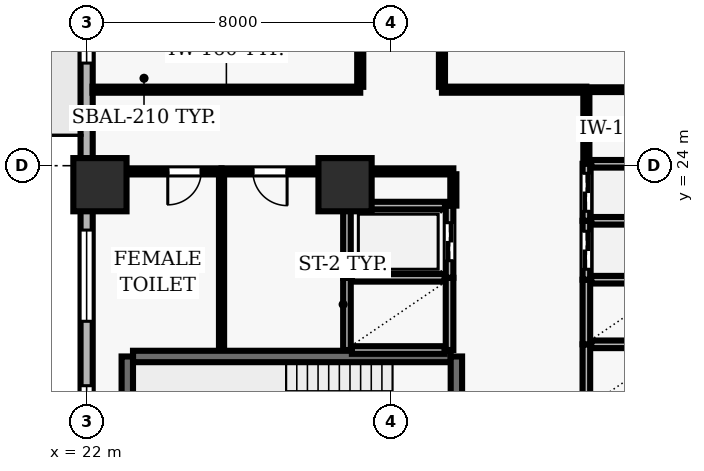
"""IFC4 building model, lengths in metres.
Left out: names, types, materials, properties, quantities, classifications, styles, units other than length and angle.
Written with IfcOpenShell. Run it as: python <this file> out.ifc"""

import sys

from ifc_helpers import new_model, si_unit, direction, frame, frame_2d, origin, origin_2d, place, context, subcontext, project, spatial, rectangle, extrude, element, fill, save


model = new_model("IFC4")
c1 = context("Model", 3, precision=1e-05, world=origin(), true_north=direction((0.0, 1.0)))
c2 = subcontext(c1, "Body", "Model", "MODEL_VIEW")
j1 = project(units=[si_unit("LENGTHUNIT", "METRE"), si_unit("PLANEANGLEUNIT", "RADIAN")], contexts=[c1])
p1 = place(None, origin())
s1 = spatial("IfcSite", under=j1, at=p1, CompositionType="ELEMENT")
p2 = place(p1, origin())
s2 = spatial("IfcBuilding", under=s1, at=p2, CompositionType="ELEMENT")
p3 = place(p2, frame((0.0, 0.0, 70.0)))
s3 = spatial("IfcBuildingStorey", under=s2, at=p3, CompositionType="ELEMENT", Elevation=70.0)
for number, where, z_axis, x_axis in (
    (1, (22.35, 23.5, 0.0), (0.0, 0.0, 1.0), (1.0, 0.0, 0.0)),
    (2, (28.8, 23.5, 0.0), (0.0, 0.0, 1.0), (1.0, 0.0, 0.0)),
):
    element("IfcColumn", number, at=place(p3, frame(where, z_axis=z_axis, x_axis=x_axis)), inside=s3, PredefinedType="COLUMN", context=c2, shape_type="SweptSolid", body=[
        extrude(rectangle(XDim=1.4, YDim=1.4, at=origin_2d()), origin(), (0.0, 0.0, 1.0), 3.9),
    ])
p4 = place(p3, frame((22.0, 51.5, 0.0), z_axis=(0.0, 0.0, 1.0), x_axis=(0.0, -1.0, 0.0)))
e3 = element("IfcWall", 3, at=p4, inside=s3, PredefinedType="SOLIDWALL", context=c2, shape_type="SweptSolid", body=[
    extrude(rectangle(XDim=49.0, YDim=0.32, at=frame_2d((24.5, 0.0))), origin(), (0.0, 0.0, 1.0), 3.69),
])
p5 = place(p4, frame((12.1, 0.0, 0.0)))
e4 = element("IfcOpeningElement", 4, at=p5, cuts=e3, PredefinedType="OPENING", context=c2, shape_type="SweptSolid", body=[
    extrude(rectangle(XDim=1.0, YDim=2.2, at=frame_2d((0.5, 1.1))), frame((0.0, 0.17, 0.0), z_axis=(0.0, -1.0, 0.0), x_axis=(1.0, 0.0, 0.0)), (0.0, 0.0, 1.0), 0.34),
])
p6 = place(p4, frame((1.522, 0.0, 0.9)))
e5 = element("IfcOpeningElement", 5, at=p6, cuts=e3, PredefinedType="OPENING", context=c2, shape_type="SweptSolid", body=[
    extrude(rectangle(XDim=2.4, YDim=1.6, at=frame_2d((1.2, 0.8))), frame((0.0, 0.17, 0.0), z_axis=(0.0, -1.0, 0.0), x_axis=(1.0, 0.0, 0.0)), (0.0, 0.0, 1.0), 0.34),
])
p7 = place(p4, frame((6.967, 0.0, 0.9)))
e6 = element("IfcOpeningElement", 6, at=p7, cuts=e3, PredefinedType="OPENING", context=c2, shape_type="SweptSolid", body=[
    extrude(rectangle(XDim=2.4, YDim=1.6, at=frame_2d((1.2, 0.8))), frame((0.0, 0.17, 0.0), z_axis=(0.0, -1.0, 0.0), x_axis=(1.0, 0.0, 0.0)), (0.0, 0.0, 1.0), 0.34),
])
p8 = place(p4, frame((17.856, 0.0, 0.9)))
e7 = element("IfcOpeningElement", 7, at=p8, cuts=e3, PredefinedType="OPENING", context=c2, shape_type="SweptSolid", body=[
    extrude(rectangle(XDim=2.4, YDim=1.6, at=frame_2d((1.2, 0.8))), frame((0.0, 0.17, 0.0), z_axis=(0.0, -1.0, 0.0), x_axis=(1.0, 0.0, 0.0)), (0.0, 0.0, 1.0), 0.34),
])
p9 = place(p4, frame((22.4, 0.0, 0.9)))
e8 = element("IfcOpeningElement", 8, at=p9, cuts=e3, PredefinedType="OPENING", context=c2, shape_type="SweptSolid", body=[
    extrude(rectangle(XDim=2.4, YDim=1.6, at=frame_2d((1.2, 0.8))), frame((0.0, 0.17, 0.0), z_axis=(0.0, -1.0, 0.0), x_axis=(1.0, 0.0, 0.0)), (0.0, 0.0, 1.0), 0.34),
])
p10 = place(p4, frame((29.194, 0.0, 0.9)))
e9 = element("IfcOpeningElement", 9, at=p10, cuts=e3, PredefinedType="OPENING", context=c2, shape_type="SweptSolid", body=[
    extrude(rectangle(XDim=2.4, YDim=1.6, at=frame_2d((1.2, 0.8))), frame((0.0, 0.17, 0.0), z_axis=(0.0, -1.0, 0.0), x_axis=(1.0, 0.0, 0.0)), (0.0, 0.0, 1.0), 0.34),
])
p11 = place(p4, frame((33.289, 0.0, 0.9)))
e10 = element("IfcOpeningElement", 10, at=p11, cuts=e3, PredefinedType="OPENING", context=c2, shape_type="SweptSolid", body=[
    extrude(rectangle(XDim=2.4, YDim=1.6, at=frame_2d((1.2, 0.8))), frame((0.0, 0.17, 0.0), z_axis=(0.0, -1.0, 0.0), x_axis=(1.0, 0.0, 0.0)), (0.0, 0.0, 1.0), 0.34),
])
p12 = place(p4, frame((39.633, 0.0, 0.9)))
e11 = element("IfcOpeningElement", 11, at=p12, cuts=e3, PredefinedType="OPENING", context=c2, shape_type="SweptSolid", body=[
    extrude(rectangle(XDim=2.4, YDim=1.6, at=frame_2d((1.2, 0.8))), frame((0.0, 0.17, 0.0), z_axis=(0.0, -1.0, 0.0), x_axis=(1.0, 0.0, 0.0)), (0.0, 0.0, 1.0), 0.34),
])
p13 = place(p3, frame((31.58, 18.98, 0.0), z_axis=(0.0, 0.0, 1.0), x_axis=(-1.0, 0.0, 0.0)))
e12 = element("IfcWall", 12, at=p13, inside=s3, PredefinedType="SHEAR", context=c2, shape_type="SweptSolid", body=[
    extrude(rectangle(XDim=8.36, YDim=0.3, at=frame_2d((4.18, 0.0))), origin(), (0.0, 0.0, 1.0), 3.69),
])
p14 = place(p3, frame((23.07, 18.98, 0.0), z_axis=(0.0, 0.0, 1.0), x_axis=(0.0, -1.0, 0.0)))
e13 = element("IfcWall", 13, at=p14, inside=s3, PredefinedType="SHEAR", context=c2, shape_type="SweptSolid", body=[
    extrude(rectangle(XDim=3.51, YDim=0.3, at=frame_2d((1.755, 0.0))), origin(), (0.0, 0.0, 1.0), 3.69),
])
p15 = place(p3, frame((31.73, 15.47, 0.0), z_axis=(0.0, 0.0, 1.0), x_axis=(0.0, 1.0, 0.0)))
e14 = element("IfcWall", 14, at=p15, inside=s3, PredefinedType="SHEAR", context=c2, shape_type="SweptSolid", body=[
    extrude(rectangle(XDim=3.51, YDim=0.3, at=frame_2d((1.755, 0.0))), origin(), (0.0, 0.0, 1.0), 3.69),
])
p16 = place(p15, frame((1.18, 0.0, 0.0)))
e15 = element("IfcOpeningElement", 15, at=p16, cuts=e14, PredefinedType="OPENING", context=c2, shape_type="SweptSolid", body=[
    extrude(rectangle(XDim=1.15, YDim=2.15, at=frame_2d((0.575, 1.075))), frame((0.0, 0.16, 0.0), z_axis=(0.0, -1.0, 0.0), x_axis=(1.0, 0.0, 0.0)), (0.0, 0.0, 1.0), 0.32),
])
p17 = place(p3, frame((35.15, 19.3, 0.0), z_axis=(0.0, 0.0, 1.0), x_axis=(0.0, -1.0, 0.0)))
e16 = element("IfcWall", 16, at=p17, inside=s3, PredefinedType="SOLIDWALL", context=c2, shape_type="SweptSolid", body=[
    extrude(rectangle(XDim=1.7, YDim=0.2, at=frame_2d((0.85, 0.0))), origin(), (0.0, 0.0, 1.0), 3.69),
])
p18 = place(p3, frame((37.42, 19.3, 0.0), z_axis=(0.0, 0.0, 1.0), x_axis=(-1.0, 0.0, 0.0)))
e17 = element("IfcWall", 17, at=p18, inside=s3, PredefinedType="SOLIDWALL", context=c2, shape_type="SweptSolid", body=[
    extrude(rectangle(XDim=2.14, YDim=0.2, at=frame_2d((1.07, 0.0))), origin(), (0.0, 0.0, 1.0), 3.69),
])
p19 = place(p3, frame((35.15, 21.0, 0.0), z_axis=(0.0, 0.0, 1.0), x_axis=(0.0, -1.0, 0.0)))
e18 = element("IfcWall", 18, at=p19, inside=s3, PredefinedType="SOLIDWALL", context=c2, shape_type="SweptSolid", body=[
    extrude(rectangle(XDim=1.7, YDim=0.2, at=frame_2d((0.85, 0.0))), origin(), (0.0, 0.0, 1.0), 3.69),
])
p20 = place(p3, frame((37.42, 21.0, 0.0), z_axis=(0.0, 0.0, 1.0), x_axis=(-1.0, 0.0, 0.0)))
e19 = element("IfcWall", 19, at=p20, inside=s3, PredefinedType="SOLIDWALL", context=c2, shape_type="SweptSolid", body=[
    extrude(rectangle(XDim=2.14, YDim=0.2, at=frame_2d((1.07, 0.0))), origin(), (0.0, 0.0, 1.0), 3.69),
])
for number, where, z_axis, x_axis in (
    (20, (28.85, 21.05, 0.0), (0.0, 0.0, 1.0), (0.0, -1.0, 0.0)),
    (21, (31.55, 19.15, 0.0), (0.0, 0.0, 1.0), (0.0, 1.0, 0.0)),
):
    element("IfcWall", number, at=place(p3, frame(where, z_axis=z_axis, x_axis=x_axis)), inside=s3, PredefinedType="SOLIDWALL", context=c2, shape_type="SweptSolid", body=[
        extrude(rectangle(XDim=1.9, YDim=0.2, at=frame_2d((0.95, 0.0))), origin(), (0.0, 0.0, 1.0), 3.69),
    ])
for number, where, z_axis, x_axis in (
    (22, (28.98, 19.15, 0.0), (0.0, 0.0, 1.0), (1.0, 0.0, 0.0)),
    (23, (31.42, 21.05, 0.0), (0.0, 0.0, 1.0), (-1.0, 0.0, 0.0)),
):
    element("IfcWall", number, at=place(p3, frame(where, z_axis=z_axis, x_axis=x_axis)), inside=s3, PredefinedType="SOLIDWALL", context=c2, shape_type="SweptSolid", body=[
        extrude(rectangle(XDim=2.44, YDim=0.2, at=frame_2d((1.22, 0.0))), origin(), (0.0, 0.0, 1.0), 3.69),
    ])
p21 = place(p3, frame((35.15, 22.55, 0.0), z_axis=(0.0, 0.0, 1.0), x_axis=(0.0, -1.0, 0.0)))
e24 = element("IfcWall", 24, at=p21, inside=s3, PredefinedType="SOLIDWALL", context=c2, shape_type="SweptSolid", body=[
    extrude(rectangle(XDim=1.55, YDim=0.2, at=frame_2d((0.775, 0.0))), origin(), (0.0, 0.0, 1.0), 3.69),
])
p22 = place(p21, frame((0.275, 0.0, 0.0)))
e25 = element("IfcOpeningElement", 25, at=p22, cuts=e24, PredefinedType="OPENING", context=c2, shape_type="SweptSolid", body=[
    extrude(rectangle(XDim=1.0, YDim=2.1, at=frame_2d((0.5, 1.05))), frame((0.0, 0.11, 0.0), z_axis=(0.0, -1.0, 0.0), x_axis=(1.0, 0.0, 0.0)), (0.0, 0.0, 1.0), 0.22),
])
p23 = place(p3, frame((37.42, 22.55, 0.0), z_axis=(0.0, 0.0, 1.0), x_axis=(-1.0, 0.0, 0.0)))
e26 = element("IfcWall", 26, at=p23, inside=s3, PredefinedType="SOLIDWALL", context=c2, shape_type="SweptSolid", body=[
    extrude(rectangle(XDim=2.14, YDim=0.2, at=frame_2d((1.07, 0.0))), origin(), (0.0, 0.0, 1.0), 3.69),
])
p24 = place(p3, frame((35.15, 24.05, 0.0), z_axis=(0.0, 0.0, 1.0), x_axis=(0.0, -1.0, 0.0)))
e27 = element("IfcWall", 27, at=p24, inside=s3, PredefinedType="SOLIDWALL", context=c2, shape_type="SweptSolid", body=[
    extrude(rectangle(XDim=1.5, YDim=0.2, at=frame_2d((0.75, 0.0))), origin(), (0.0, 0.0, 1.0), 3.69),
])
p25 = place(p24, frame((0.25, 0.0, 0.0)))
e28 = element("IfcOpeningElement", 28, at=p25, cuts=e27, PredefinedType="OPENING", context=c2, shape_type="SweptSolid", body=[
    extrude(rectangle(XDim=1.0, YDim=2.1, at=frame_2d((0.5, 1.05))), frame((0.0, 0.11, 0.0), z_axis=(0.0, -1.0, 0.0), x_axis=(1.0, 0.0, 0.0)), (0.0, 0.0, 1.0), 0.22),
])
p26 = place(p3, frame((37.42, 24.05, 0.0), z_axis=(0.0, 0.0, 1.0), x_axis=(-1.0, 0.0, 0.0)))
e29 = element("IfcWall", 29, at=p26, inside=s3, PredefinedType="SOLIDWALL", context=c2, shape_type="SweptSolid", body=[
    extrude(rectangle(XDim=2.14, YDim=0.2, at=frame_2d((1.07, 0.0))), origin(), (0.0, 0.0, 1.0), 3.69),
])
p27 = place(p3, frame((28.85, 22.95, 0.0), z_axis=(0.0, 0.0, 1.0), x_axis=(0.0, -1.0, 0.0)))
e30 = element("IfcWall", 30, at=p27, inside=s3, PredefinedType="SOLIDWALL", context=c2, shape_type="SweptSolid", body=[
    extrude(rectangle(XDim=1.9, YDim=0.2, at=frame_2d((0.95, 0.0))), origin(), (0.0, 0.0, 1.0), 3.69),
])
p28 = place(p3, frame((31.55, 21.05, 0.0), z_axis=(0.0, 0.0, 1.0), x_axis=(0.0, 1.0, 0.0)))
e31 = element("IfcWall", 31, at=p28, inside=s3, PredefinedType="SOLIDWALL", context=c2, shape_type="SweptSolid", body=[
    extrude(rectangle(XDim=1.9, YDim=0.2, at=frame_2d((0.95, 0.0))), origin(), (0.0, 0.0, 1.0), 3.69),
])
p29 = place(p28, frame((0.45, 0.0, 0.0)))
e32 = element("IfcOpeningElement", 32, at=p29, cuts=e31, PredefinedType="OPENING", context=c2, shape_type="SweptSolid", body=[
    extrude(rectangle(XDim=1.0, YDim=2.1, at=frame_2d((0.5, 1.05))), frame((0.0, 0.11, 0.0), z_axis=(0.0, -1.0, 0.0), x_axis=(1.0, 0.0, 0.0)), (0.0, 0.0, 1.0), 0.22),
])
p30 = place(p3, frame((31.43, 22.95, 0.0), z_axis=(0.0, 0.0, 1.0), x_axis=(-1.0, 0.0, 0.0)))
e33 = element("IfcWall", 33, at=p30, inside=s3, PredefinedType="SOLIDWALL", context=c2, shape_type="SweptSolid", body=[
    extrude(rectangle(XDim=2.46, YDim=0.2, at=frame_2d((1.23, 0.0))), origin(), (0.0, 0.0, 1.0), 3.69),
])
p31 = place(p3, frame((25.55, 23.85, 0.0), z_axis=(0.0, 0.0, 1.0), x_axis=(-1.0, 0.0, 0.0)))
e34 = element("IfcWall", 34, at=p31, inside=s3, PredefinedType="PARTITIONING", context=c2, shape_type="SweptSolid", body=[
    extrude(rectangle(XDim=3.35, YDim=0.16, at=frame_2d((1.675, 0.0))), origin(), (0.0, 0.0, 1.0), 2.995),
])
p32 = place(p31, frame((0.535, 0.0, 0.0)))
e35 = element("IfcOpeningElement", 35, at=p32, cuts=e34, PredefinedType="OPENING", context=c2, shape_type="SweptSolid", body=[
    extrude(rectangle(XDim=0.88, YDim=2.1, at=frame_2d((0.44, 1.05))), frame((0.0, 0.09, 0.0), z_axis=(0.0, -1.0, 0.0), x_axis=(1.0, 0.0, 0.0)), (0.0, 0.0, 1.0), 0.18),
])
p33 = place(p3, frame((28.8, 23.85, 0.0), z_axis=(0.0, 0.0, 1.0), x_axis=(-1.0, 0.0, 0.0)))
e36 = element("IfcWall", 36, at=p33, inside=s3, PredefinedType="PARTITIONING", context=c2, shape_type="SweptSolid", body=[
    extrude(rectangle(XDim=3.25, YDim=0.16, at=frame_2d((1.625, 0.0))), origin(), (0.0, 0.0, 1.0), 2.995),
])
p34 = place(p33, frame((1.525, 0.0, 0.0)))
e37 = element("IfcOpeningElement", 37, at=p34, cuts=e36, PredefinedType="OPENING", context=c2, shape_type="SweptSolid", body=[
    extrude(rectangle(XDim=0.9, YDim=2.1, at=frame_2d((0.45, 1.05))), frame((0.0, 0.09, 0.0), z_axis=(0.0, -1.0, 0.0), x_axis=(1.0, 0.0, 0.0)), (0.0, 0.0, 1.0), 0.18),
])
p35 = place(p3, frame((28.8, 23.85, 0.0), z_axis=(0.0, 0.0, 1.0), x_axis=(1.0, 0.0, 0.0)))
e38 = element("IfcWall", 38, at=p35, inside=s3, PredefinedType="PARTITIONING", context=c2, shape_type="SweptSolid", body=[
    extrude(rectangle(XDim=2.85, YDim=0.16, at=frame_2d((1.425, 0.0))), origin(), (0.0, 0.0, 1.0), 3.69),
])
p36 = place(p3, frame((29.2, 26.0, 0.0), z_axis=(0.0, 0.0, 1.0), x_axis=(-1.0, 0.0, 0.0)))
e39 = element("IfcWall", 39, at=p36, inside=s3, PredefinedType="PARTITIONING", context=c2, shape_type="SweptSolid", body=[
    extrude(rectangle(XDim=7.045, YDim=0.16, at=frame_2d((3.522, 0.0))), origin(), (0.0, 0.0, 1.0), 3.69),
])
p37 = place(p3, frame((35.15, 26.0, 0.0), z_axis=(0.0, 0.0, 1.0), x_axis=(-1.0, 0.0, 0.0)))
e40 = element("IfcWall", 40, at=p37, inside=s3, PredefinedType="PARTITIONING", context=c2, shape_type="SweptSolid", body=[
    extrude(rectangle(XDim=3.8, YDim=0.16, at=frame_2d((1.9, 0.0))), origin(), (0.0, 0.0, 1.0), 3.69),
])
p38 = place(p3, frame((35.15, 26.0, 0.0), z_axis=(0.0, 0.0, 1.0), x_axis=(1.0, 0.0, 0.0)))
e41 = element("IfcWall", 41, at=p38, inside=s3, PredefinedType="PARTITIONING", context=c2, shape_type="SweptSolid", body=[
    extrude(rectangle(XDim=2.695, YDim=0.125, at=frame_2d((1.348, 0.0))), origin(), (0.0, 0.0, 1.0), 3.69),
])
p39 = place(p3, frame((25.55, 19.16, 0.0), z_axis=(0.0, 0.0, 1.0), x_axis=(0.0, 1.0, 0.0)))
e42 = element("IfcWall", 42, at=p39, inside=s3, PredefinedType="PARTITIONING", context=c2, shape_type="SweptSolid", body=[
    extrude(rectangle(XDim=4.615, YDim=0.135, at=frame_2d((2.308, 0.0))), origin(), (0.0, 0.0, 1.0), 3.69),
])
p40 = place(p3, frame((28.8, 22.95, 0.0), z_axis=(0.0, 0.0, 1.0), x_axis=(0.0, 1.0, 0.0)))
e43 = element("IfcWall", 43, at=p40, inside=s3, PredefinedType="PARTITIONING", context=c2, shape_type="SweptSolid", body=[
    extrude(rectangle(XDim=0.825, YDim=0.125, at=frame_2d((0.413, 0.0))), origin(), (0.0, 0.0, 1.0), 3.69),
])
p41 = place(p3, frame((29.2, 53.845, 0.0), z_axis=(0.0, 0.0, 1.0), x_axis=(0.0, -1.0, 0.0)))
e44 = element("IfcWall", 44, at=p41, inside=s3, PredefinedType="PARTITIONING", context=c2, shape_type="SweptSolid", body=[
    extrude(rectangle(XDim=27.77, YDim=0.16, at=frame_2d((13.885, 0.0))), origin(), (0.0, 0.0, 1.0), 3.69),
])
p42 = place(p41, frame((13.435, 0.0, 0.0)))
e45 = element("IfcOpeningElement", 45, at=p42, cuts=e44, PredefinedType="OPENING", context=c2, shape_type="SweptSolid", body=[
    extrude(rectangle(XDim=0.9, YDim=2.1, at=frame_2d((0.45, 1.05))), frame((0.0, 0.09, 0.0), z_axis=(0.0, -1.0, 0.0), x_axis=(1.0, 0.0, 0.0)), (0.0, 0.0, 1.0), 0.18),
])
p43 = place(p3, frame((31.35, 26.075, 0.0), z_axis=(0.0, 0.0, 1.0), x_axis=(0.0, 1.0, 0.0)))
e46 = element("IfcWall", 46, at=p43, inside=s3, PredefinedType="PARTITIONING", context=c2, shape_type="SweptSolid", body=[
    extrude(rectangle(XDim=27.77, YDim=0.16, at=frame_2d((13.885, 0.0))), origin(), (0.0, 0.0, 1.0), 3.69),
])
p44 = place(p43, frame((13.435, 0.0, 0.0)))
e47 = element("IfcOpeningElement", 47, at=p44, cuts=e46, PredefinedType="OPENING", context=c2, shape_type="SweptSolid", body=[
    extrude(rectangle(XDim=0.9, YDim=2.1, at=frame_2d((0.45, 1.05))), frame((0.0, 0.09, 0.0), z_axis=(0.0, -1.0, 0.0), x_axis=(1.0, 0.0, 0.0)), (0.0, 0.0, 1.0), 0.18),
])
p45 = place(p3, frame((31.65, 23.775, 0.0), z_axis=(0.0, 0.0, 1.0), x_axis=(0.0, -1.0, 0.0)))
e48 = element("IfcWall", 48, at=p45, inside=s3, PredefinedType="PARTITIONING", context=c2, shape_type="SweptSolid", body=[
    extrude(rectangle(XDim=0.825, YDim=0.16, at=frame_2d((0.413, 0.0))), origin(), (0.0, 0.0, 1.0), 3.69),
])
p46 = place(p3, frame((35.15, 24.07, 0.0), z_axis=(0.0, 0.0, 1.0), x_axis=(0.0, 1.0, 0.0)))
e49 = element("IfcWall", 49, at=p46, inside=s3, PredefinedType="PARTITIONING", context=c2, shape_type="SweptSolid", body=[
    extrude(rectangle(XDim=1.855, YDim=0.16, at=frame_2d((0.927, 0.0))), origin(), (0.0, 0.0, 1.0), 3.69),
])
p47 = place(p9, origin())
e50 = element("IfcWindow", 50, at=p47, inside=s3, PartitioningType="SINGLE_PANEL", PredefinedType="WINDOW", context=c2, shape_type="SweptSolid", body=[
    extrude(rectangle(XDim=2.4, YDim=1.6, at=frame_2d((1.2, 0.8))), frame((0.0, 0.03, 0.0), z_axis=(0.0, -1.0, 0.0), x_axis=(1.0, 0.0, 0.0)), (0.0, 0.0, 1.0), 0.06),
])
fill(e8, e50)
p48 = place(p10, origin())
e51 = element("IfcWindow", 51, at=p48, inside=s3, PartitioningType="SINGLE_PANEL", PredefinedType="WINDOW", context=c2, shape_type="SweptSolid", body=[
    extrude(rectangle(XDim=2.4, YDim=1.6, at=frame_2d((1.2, 0.8))), frame((0.0, 0.03, 0.0), z_axis=(0.0, -1.0, 0.0), x_axis=(1.0, 0.0, 0.0)), (0.0, 0.0, 1.0), 0.06),
])
fill(e9, e51)
p49 = place(p11, origin())
e52 = element("IfcWindow", 52, at=p49, inside=s3, PartitioningType="SINGLE_PANEL", PredefinedType="WINDOW", context=c2, shape_type="SweptSolid", body=[
    extrude(rectangle(XDim=2.4, YDim=1.6, at=frame_2d((1.2, 0.8))), frame((0.0, 0.03, 0.0), z_axis=(0.0, -1.0, 0.0), x_axis=(1.0, 0.0, 0.0)), (0.0, 0.0, 1.0), 0.06),
])
fill(e10, e52)
p50 = place(p22, origin())
e53 = element("IfcDoor", 53, at=p50, inside=s3, OperationType="DOUBLE_DOOR_SLIDING", PredefinedType="DOOR", context=c2, shape_type="SweptSolid", body=[
    extrude(rectangle(XDim=1.0, YDim=2.1, at=frame_2d((0.5, 1.05))), frame((0.0, 0.025, 0.0), z_axis=(0.0, -1.0, 0.0), x_axis=(1.0, 0.0, 0.0)), (0.0, 0.0, 1.0), 0.05),
])
fill(e25, e53)
p51 = place(p25, origin())
e54 = element("IfcDoor", 54, at=p51, inside=s3, OperationType="DOUBLE_DOOR_SLIDING", PredefinedType="DOOR", context=c2, shape_type="SweptSolid", body=[
    extrude(rectangle(XDim=1.0, YDim=2.1, at=frame_2d((0.5, 1.05))), frame((0.0, 0.025, 0.0), z_axis=(0.0, -1.0, 0.0), x_axis=(1.0, 0.0, 0.0)), (0.0, 0.0, 1.0), 0.05),
])
fill(e28, e54)
p52 = place(p29, origin())
e55 = element("IfcDoor", 55, at=p52, inside=s3, OperationType="DOUBLE_DOOR_SLIDING", PredefinedType="DOOR", context=c2, shape_type="SweptSolid", body=[
    extrude(rectangle(XDim=1.0, YDim=2.1, at=frame_2d((0.5, 1.05))), frame((0.0, 0.025, 0.0), z_axis=(0.0, -1.0, 0.0), x_axis=(1.0, 0.0, 0.0)), (0.0, 0.0, 1.0), 0.05),
])
fill(e32, e55)
p53 = place(p32, origin())
e56 = element("IfcDoor", 56, at=p53, inside=s3, OperationType="SINGLE_SWING_RIGHT", PredefinedType="DOOR", context=c2, shape_type="SweptSolid", body=[
    extrude(rectangle(XDim=0.88, YDim=2.1, at=frame_2d((0.44, 1.05))), frame((0.0, 0.025, 0.0), z_axis=(0.0, -1.0, 0.0), x_axis=(1.0, 0.0, 0.0)), (0.0, 0.0, 1.0), 0.05),
])
fill(e35, e56)
p54 = place(p34, origin())
e57 = element("IfcDoor", 57, at=p54, inside=s3, OperationType="SINGLE_SWING_LEFT", PredefinedType="DOOR", context=c2, shape_type="SweptSolid", body=[
    extrude(rectangle(XDim=0.9, YDim=2.1, at=frame_2d((0.45, 1.05))), frame((0.0, 0.025, 0.0), z_axis=(0.0, -1.0, 0.0), x_axis=(1.0, 0.0, 0.0)), (0.0, 0.0, 1.0), 0.05),
])
fill(e37, e57)
save(model, sys.argv[1])
